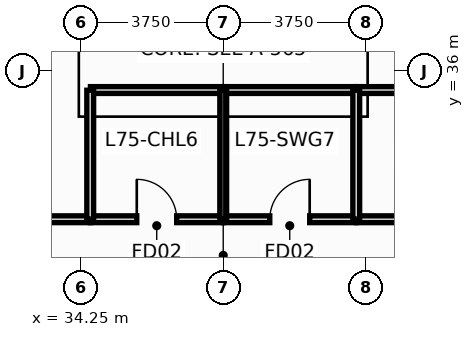
"""IFC4 building model, lengths in metres.
Left out: names, types, materials, properties, quantities, classifications, styles, units other than length and angle.
Written with IfcOpenShell. Run it as: python <this file> out.ifc"""

import sys

from ifc_helpers import new_model, si_unit, direction, frame, frame_2d, origin, place, context, subcontext, project, spatial, rectangle, extrude, element, fill, save


model = new_model("IFC4")
c1 = context("Model", 3, precision=1e-05, world=origin(), true_north=direction((0.0, 1.0)))
c2 = subcontext(c1, "Body", "Model", "MODEL_VIEW")
j1 = project(units=[si_unit("LENGTHUNIT", "METRE"), si_unit("PLANEANGLEUNIT", "RADIAN")], contexts=[c1])
p1 = place(None, origin())
s1 = spatial("IfcSite", under=j1, at=p1, CompositionType="ELEMENT")
p2 = place(p1, origin())
s2 = spatial("IfcBuilding", under=s1, at=p2, CompositionType="ELEMENT")
p3 = place(p2, frame((0.0, 0.0, 284.6)))
s3 = spatial("IfcBuildingStorey", under=s2, at=p3, CompositionType="ELEMENT", Elevation=284.6)
p4 = place(p3, frame((24.693, 32.1, 0.0), z_axis=(0.0, 0.0, 1.0), x_axis=(1.0, 0.0, 0.0)))
e1 = element("IfcWall", 1, at=p4, inside=s3, PredefinedType="PARTITIONING", context=c2, shape_type="SweptSolid", body=[
    extrude(rectangle(XDim=9.802, YDim=0.18, at=frame_2d((4.901, 0.0))), origin(), (0.0, 0.0, 1.0), 4.635),
])
p5 = place(p4, frame((4.02, 0.0, 0.0)))
e2 = element("IfcOpeningElement", 2, at=p5, cuts=e1, PredefinedType="OPENING", context=c2, shape_type="SweptSolid", body=[
    extrude(rectangle(XDim=1.05, YDim=2.15, at=frame_2d((0.525, 1.075))), frame((0.0, 0.102, 0.0), z_axis=(0.0, -1.0, 0.0), x_axis=(1.0, 0.0, 0.0)), (0.0, 0.0, 1.0), 0.204),
])
p6 = place(p3, frame((41.505, 32.1, 0.0), z_axis=(0.0, 0.0, 1.0), x_axis=(1.0, 0.0, 0.0)))
e3 = element("IfcWall", 3, at=p6, inside=s3, PredefinedType="PARTITIONING", context=c2, shape_type="SweptSolid", body=[
    extrude(rectangle(XDim=9.075, YDim=0.18, at=frame_2d((4.538, 0.0))), origin(), (0.0, 0.0, 1.0), 4.635),
])
p7 = place(p6, frame((4.012, 0.0, 0.0)))
e4 = element("IfcOpeningElement", 4, at=p7, cuts=e3, PredefinedType="OPENING", context=c2, shape_type="SweptSolid", body=[
    extrude(rectangle(XDim=1.05, YDim=2.15, at=frame_2d((0.525, 1.075))), frame((0.0, 0.102, 0.0), z_axis=(0.0, -1.0, 0.0), x_axis=(1.0, 0.0, 0.0)), (0.0, 0.0, 1.0), 0.204),
])
p8 = place(p3, frame((41.505, 35.5, 0.0), z_axis=(0.0, 0.0, 1.0), x_axis=(1.0, 0.0, 0.0)))
e5 = element("IfcWall", 5, at=p8, inside=s3, PredefinedType="PARTITIONING", context=c2, shape_type="SweptSolid", body=[
    extrude(rectangle(XDim=7.175, YDim=0.18, at=frame_2d((3.587, 0.0))), origin(), (0.0, 0.0, 1.0), 4.95),
])
p9 = place(p3, frame((34.505, 32.1, 0.0), z_axis=(0.0, 0.0, 1.0), x_axis=(1.0, 0.0, 0.0)))
e6 = element("IfcWall", 6, at=p9, inside=s3, PredefinedType="PARTITIONING", context=c2, shape_type="SweptSolid", body=[
    extrude(rectangle(XDim=3.49, YDim=0.18, at=frame_2d((1.745, 0.0))), origin(), (0.0, 0.0, 1.0), 4.635),
])
p10 = place(p9, frame((1.22, 0.0, 0.0)))
e7 = element("IfcOpeningElement", 7, at=p10, cuts=e6, PredefinedType="OPENING", context=c2, shape_type="SweptSolid", body=[
    extrude(rectangle(XDim=1.05, YDim=2.15, at=frame_2d((0.525, 1.075))), frame((0.0, 0.102, 0.0), z_axis=(0.0, -1.0, 0.0), x_axis=(1.0, 0.0, 0.0)), (0.0, 0.0, 1.0), 0.204),
])
p11 = place(p3, frame((38.005, 32.1, 0.0), z_axis=(0.0, 0.0, 1.0), x_axis=(1.0, 0.0, 0.0)))
e8 = element("IfcWall", 8, at=p11, inside=s3, PredefinedType="PARTITIONING", context=c2, shape_type="SweptSolid", body=[
    extrude(rectangle(XDim=3.49, YDim=0.18, at=frame_2d((1.745, 0.0))), origin(), (0.0, 0.0, 1.0), 4.635),
])
p12 = place(p11, frame((1.22, 0.0, 0.0)))
e9 = element("IfcOpeningElement", 9, at=p12, cuts=e8, PredefinedType="OPENING", context=c2, shape_type="SweptSolid", body=[
    extrude(rectangle(XDim=1.05, YDim=2.15, at=frame_2d((0.525, 1.075))), frame((0.0, 0.102, 0.0), z_axis=(0.0, -1.0, 0.0), x_axis=(1.0, 0.0, 0.0)), (0.0, 0.0, 1.0), 0.204),
])
for number, where, z_axis, x_axis in (
    (10, (34.505, 35.5, 0.0), (0.0, 0.0, 1.0), (1.0, 0.0, 0.0)),
    (11, (38.005, 35.5, 0.0), (0.0, 0.0, 1.0), (1.0, 0.0, 0.0)),
):
    element("IfcWall", number, at=place(p3, frame(where, z_axis=z_axis, x_axis=x_axis)), inside=s3, PredefinedType="PARTITIONING", context=c2, shape_type="SweptSolid", body=[
        extrude(rectangle(XDim=3.49, YDim=0.18, at=frame_2d((1.745, 0.0))), origin(), (0.0, 0.0, 1.0), 4.95),
    ])
for number, where, z_axis, x_axis in (
    (12, (34.5, 32.105, 0.0), (0.0, 0.0, 1.0), (0.0, 1.0, 0.0)),
    (13, (38.0, 32.105, 0.0), (0.0, 0.0, 1.0), (0.0, 1.0, 0.0)),
    (14, (41.5, 32.105, 0.0), (0.0, 0.0, 1.0), (0.0, 1.0, 0.0)),
):
    element("IfcWall", number, at=place(p3, frame(where, z_axis=z_axis, x_axis=x_axis)), inside=s3, PredefinedType="PARTITIONING", context=c2, shape_type="SweptSolid", body=[
        extrude(rectangle(XDim=3.39, YDim=0.18, at=frame_2d((1.695, 0.0))), origin(), (0.0, 0.0, 1.0), 4.95),
    ])
p13 = place(p10, origin())
e15 = element("IfcDoor", 15, at=p13, inside=s3, OperationType="SINGLE_SWING_LEFT", PredefinedType="DOOR", context=c2, shape_type="SweptSolid", body=[
    extrude(rectangle(XDim=1.05, YDim=2.15, at=frame_2d((0.525, 1.075))), frame((0.0, 0.025, 0.0), z_axis=(0.0, -1.0, 0.0), x_axis=(1.0, 0.0, 0.0)), (0.0, 0.0, 1.0), 0.05),
])
fill(e7, e15)
p14 = place(p12, origin())
e16 = element("IfcDoor", 16, at=p14, inside=s3, OperationType="SINGLE_SWING_RIGHT", PredefinedType="DOOR", context=c2, shape_type="SweptSolid", body=[
    extrude(rectangle(XDim=1.05, YDim=2.15, at=frame_2d((0.525, 1.075))), frame((0.0, 0.025, 0.0), z_axis=(0.0, -1.0, 0.0), x_axis=(1.0, 0.0, 0.0)), (0.0, 0.0, 1.0), 0.05),
])
fill(e9, e16)
save(model, sys.argv[1])
